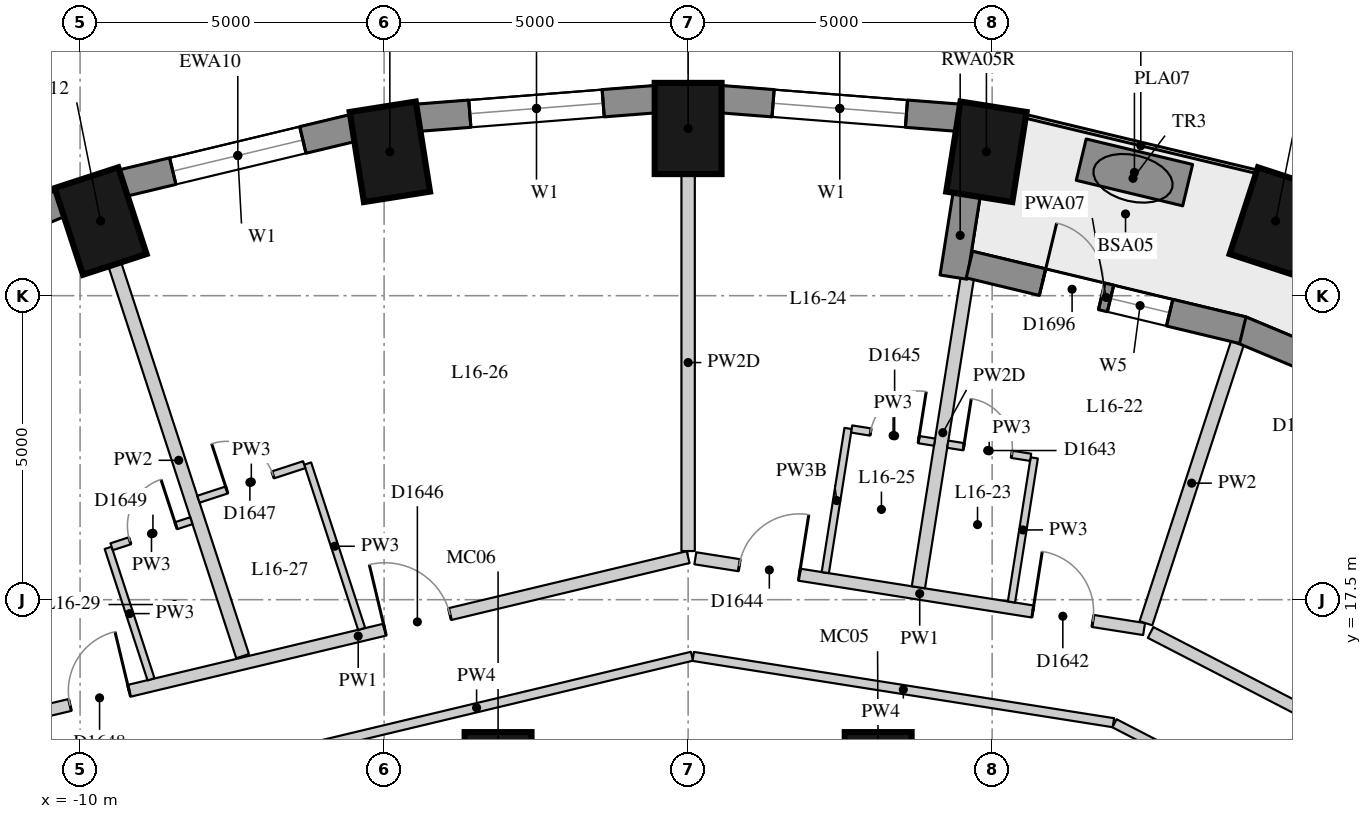
"""IFC4 building model, lengths in metres.
Left out: names, types, materials, properties, quantities, classifications, styles, units other than length and angle.
Written with IfcOpenShell. Run it as: python <this file> out.ifc"""

import sys

from ifc_helpers import new_model, si_unit, direction, frame, frame_2d, origin, origin_2d, place, context, subcontext, project, spatial, rectangle, extrude, element, fill, save


model = new_model("IFC4")
c1 = context("Model", 3, precision=1e-05, world=origin(), true_north=direction((0.0, 1.0)))
c2 = subcontext(c1, "Body", "Model", "MODEL_VIEW")
j1 = project(units=[si_unit("LENGTHUNIT", "METRE"), si_unit("PLANEANGLEUNIT", "RADIAN")], contexts=[c1])
p1 = place(None, origin())
s1 = spatial("IfcSite", under=j1, at=p1, CompositionType="ELEMENT")
p2 = place(p1, origin())
s2 = spatial("IfcBuilding", under=s1, at=p2, CompositionType="ELEMENT")
p3 = place(p2, frame((0.0, 0.0, 61.3)))
s3 = spatial("IfcBuildingStorey", under=s2, at=p3, CompositionType="ELEMENT", Elevation=61.3)
for number, where, z_axis, x_axis in (
    (1, (9.662, 23.727, 0.0), (0.0, 0.0, 1.0), (0.31, 0.951, 0.0)),
    (2, (4.906, 24.866, 0.0), (0.0, 0.0, 1.0), (0.156, 0.988, 0.0)),
    (3, (0.0, 25.25, 0.0), (0.0, 0.0, 1.0), (0.0, 1.0, 0.0)),
    (4, (-4.906, 24.866, 0.0), (0.0, 0.0, 1.0), (-0.156, 0.988, 0.0)),
    (5, (-9.662, 23.727, 0.0), (0.0, 0.0, 1.0), (-0.31, 0.951, 0.0)),
):
    element("IfcColumn", number, at=place(p3, frame(where, z_axis=z_axis, x_axis=x_axis)), inside=s3, PredefinedType="COLUMN", context=c2, shape_type="SweptSolid", body=[
        extrude(rectangle(XDim=1.5, YDim=1.1, at=origin_2d()), origin(), (0.0, 0.0, 1.0), 3.3),
    ])
for number, where, z_axis, x_axis in (
    (6, (3.126, 14.772, 0.0), (0.0, 0.0, 1.0), (1.0, 0.0, 0.0)),
    (7, (-3.126, 14.772, 0.0), (0.0, 0.0, 1.0), (1.0, 0.0, 0.0)),
):
    element("IfcColumn", number, at=place(p3, frame(where, z_axis=z_axis, x_axis=x_axis)), inside=s3, PredefinedType="COLUMN", context=c2, shape_type="SweptSolid", body=[
        extrude(rectangle(XDim=1.1, YDim=1.1, at=origin_2d()), origin(), (0.0, 0.0, 1.0), 3.3),
    ])
p4 = place(p3, frame((4.457, 25.426, 0.0), z_axis=(0.0, 0.0, 1.0), x_axis=(-0.996955972145, 0.077966592873, 0.0)))
e8 = element("IfcWall", 8, at=p4, inside=s3, PredefinedType="SOLIDWALL", context=c2, shape_type="SweptSolid", body=[
    extrude(rectangle(XDim=3.939, YDim=0.45, at=frame_2d((1.97, 0.0))), origin(), (0.0, 0.0, 1.0), 3.02),
])
p5 = place(p4, frame((0.87, 0.0, 0.4)))
e9 = element("IfcOpeningElement", 9, at=p5, cuts=e8, PredefinedType="OPENING", context=c2, shape_type="SweptSolid", body=[
    extrude(rectangle(XDim=2.2, YDim=1.75, at=frame_2d((1.1, 0.875))), frame((0.0, 0.235, 0.0), z_axis=(0.0, -1.0, 0.0), x_axis=(1.0, 0.0, 0.0)), (0.0, 0.0, 1.0), 0.47),
])
p6 = place(p3, frame((-0.53, 25.733, 0.0), z_axis=(0.0, 0.0, 1.0), x_axis=(-0.996955972145, -0.077966592873, 0.0)))
e10 = element("IfcWall", 10, at=p6, inside=s3, PredefinedType="SOLIDWALL", context=c2, shape_type="SweptSolid", body=[
    extrude(rectangle(XDim=3.939, YDim=0.45, at=frame_2d((1.97, 0.0))), origin(), (0.0, 0.0, 1.0), 3.02),
])
p7 = place(p6, frame((0.87, 0.0, 0.4)))
e11 = element("IfcOpeningElement", 11, at=p7, cuts=e10, PredefinedType="OPENING", context=c2, shape_type="SweptSolid", body=[
    extrude(rectangle(XDim=2.2, YDim=1.75, at=frame_2d((1.1, 0.875))), frame((0.0, 0.235, 0.0), z_axis=(0.0, -1.0, 0.0), x_axis=(1.0, 0.0, 0.0)), (0.0, 0.0, 1.0), 0.47),
])
p8 = place(p3, frame((-5.504, 25.26, 0.0), z_axis=(0.0, 0.0, 1.0), x_axis=(-0.972496561493, -0.232917233979, 0.0)))
e12 = element("IfcWall", 12, at=p8, inside=s3, PredefinedType="SOLIDWALL", context=c2, shape_type="SweptSolid", body=[
    extrude(rectangle(XDim=3.911, YDim=0.45, at=frame_2d((1.956, 0.0))), origin(), (0.0, 0.0, 1.0), 3.02),
])
p9 = place(p8, frame((0.855, 0.0, 0.4)))
e13 = element("IfcOpeningElement", 13, at=p9, cuts=e12, PredefinedType="OPENING", context=c2, shape_type="SweptSolid", body=[
    extrude(rectangle(XDim=2.2, YDim=1.75, at=frame_2d((1.1, 0.875))), frame((0.0, 0.235, 0.0), z_axis=(0.0, -1.0, 0.0), x_axis=(1.0, 0.0, 0.0)), (0.0, 0.0, 1.0), 0.47),
])
p10 = place(p3, frame((-10.315, 24.021, 0.0), z_axis=(0.0, 0.0, 1.0), x_axis=(-0.923031964282, -0.384723267966, 0.0)))
e14 = element("IfcWall", 14, at=p10, inside=s3, PredefinedType="SOLIDWALL", context=c2, shape_type="SweptSolid", body=[
    extrude(rectangle(XDim=3.856, YDim=0.45, at=frame_2d((1.928, 0.0))), origin(), (0.0, 0.0, 1.0), 3.02),
])
p11 = place(p10, frame((0.828, 0.0, 0.4)))
e15 = element("IfcOpeningElement", 15, at=p11, cuts=e14, PredefinedType="OPENING", context=c2, shape_type="SweptSolid", body=[
    extrude(rectangle(XDim=2.2, YDim=1.75, at=frame_2d((1.1, 0.875))), frame((0.0, 0.235, 0.0), z_axis=(0.0, -1.0, 0.0), x_axis=(1.0, 0.0, 0.0)), (0.0, 0.0, 1.0), 0.47),
])
p12 = place(p3, frame((4.583, 24.178, 0.0), z_axis=(0.0, 0.0, 1.0), x_axis=(-0.156133927791, -0.98773589415, 0.0)))
e16 = element("IfcWall", 16, at=p12, inside=s3, PredefinedType="SOLIDWALL", context=c2, shape_type="SweptSolid", body=[
    extrude(rectangle(XDim=1.39, YDim=0.45, at=frame_2d((0.695, 0.0))), origin(), (0.0, 0.0, 1.0), 2.47),
])
p13 = place(p3, frame((13.31, 20.178, 0.0), z_axis=(0.0, 0.0, 1.0), x_axis=(-0.922634412489, 0.385675693935, 0.0)))
e17 = element("IfcWall", 17, at=p13, inside=s3, PredefinedType="SOLIDWALL", context=c2, shape_type="SweptSolid", body=[
    extrude(rectangle(XDim=4.577, YDim=0.45, at=frame_2d((2.288, 0.0))), origin(), (0.0, 0.0, 1.0), 3.02),
])
p14 = place(p13, frame((1.213, 0.0, 0.4)))
e18 = element("IfcOpeningElement", 18, at=p14, cuts=e17, PredefinedType="OPENING", context=c2, shape_type="SweptSolid", body=[
    extrude(rectangle(XDim=1.0, YDim=1.75, at=frame_2d((0.5, 0.875))), frame((0.0, 0.235, 0.0), z_axis=(0.0, -1.0, 0.0), x_axis=(1.0, 0.0, 0.0)), (0.0, 0.0, 1.0), 0.47),
])
p15 = place(p13, frame((2.363, 0.0, 0.0)))
e19 = element("IfcOpeningElement", 19, at=p15, cuts=e17, PredefinedType="OPENING", context=c2, shape_type="SweptSolid", body=[
    extrude(rectangle(XDim=1.0, YDim=2.15, at=frame_2d((0.5, 1.075))), frame((0.0, 0.235, 0.0), z_axis=(0.0, -1.0, 0.0), x_axis=(1.0, 0.0, 0.0)), (0.0, 0.0, 1.0), 0.47),
])
p16 = place(p3, frame((9.122, 21.932, 0.0), z_axis=(0.0, 0.0, 1.0), x_axis=(-0.972346547441, 0.233542697764, 0.0)))
e20 = element("IfcWall", 20, at=p16, inside=s3, PredefinedType="SOLIDWALL", context=c2, shape_type="SweptSolid", body=[
    extrude(rectangle(XDim=4.624, YDim=0.45, at=frame_2d((2.312, 0.0))), origin(), (0.0, 0.0, 1.0), 3.02),
])
p17 = place(p16, frame((1.237, 0.0, 0.4)))
e21 = element("IfcOpeningElement", 21, at=p17, cuts=e20, PredefinedType="OPENING", context=c2, shape_type="SweptSolid", body=[
    extrude(rectangle(XDim=1.0, YDim=1.75, at=frame_2d((0.5, 0.875))), frame((0.0, 0.235, 0.0), z_axis=(0.0, -1.0, 0.0), x_axis=(1.0, 0.0, 0.0)), (0.0, 0.0, 1.0), 0.47),
])
p18 = place(p16, frame((2.387, 0.0, 0.0)))
e22 = element("IfcOpeningElement", 22, at=p18, cuts=e20, PredefinedType="OPENING", context=c2, shape_type="SweptSolid", body=[
    extrude(rectangle(XDim=1.0, YDim=2.15, at=frame_2d((0.5, 1.075))), frame((0.0, 0.235, 0.0), z_axis=(0.0, -1.0, 0.0), x_axis=(1.0, 0.0, 0.0)), (0.0, 0.0, 1.0), 0.47),
])
p19 = place(p3, frame((8.215, 24.318, 0.0), z_axis=(0.0, 0.0, 1.0), x_axis=(-0.972504142103, 0.232885580473, 0.0)))
e23 = element("IfcWall", 23, at=p19, inside=s3, PredefinedType="USERDEFINED", context=c2, shape_type="SweptSolid", body=[
    extrude(rectangle(XDim=1.8, YDim=0.7, at=frame_2d((0.9, 0.0))), origin(), (0.0, 0.0, 1.0), 0.75),
])
p20 = place(p3, frame((-10.852, 15.605, 0.0), z_axis=(0.0, 0.0, 1.0), x_axis=(0.972573296372, 0.232596610431, 0.0)))
e24 = element("IfcWall", 24, at=p20, inside=s3, PredefinedType="PARTITIONING", context=c2, shape_type="SweptSolid", body=[
    extrude(rectangle(XDim=11.157, YDim=0.2, at=frame_2d((5.579, 0.0))), origin(), (0.0, 0.0, 1.0), 3.02),
])
p21 = place(p20, frame((6.029, 0.0, 0.0)))
e25 = element("IfcOpeningElement", 25, at=p21, cuts=e24, PredefinedType="OPENING", context=c2, shape_type="SweptSolid", body=[
    extrude(rectangle(XDim=1.1, YDim=2.1, at=frame_2d((0.55, 1.05))), frame((0.0, 0.11, 0.0), z_axis=(0.0, -1.0, 0.0), x_axis=(1.0, 0.0, 0.0)), (0.0, 0.0, 1.0), 0.22),
])
p22 = place(p20, frame((0.705, 0.0, 0.0)))
e26 = element("IfcOpeningElement", 26, at=p22, cuts=e24, PredefinedType="OPENING", context=c2, shape_type="SweptSolid", body=[
    extrude(rectangle(XDim=1.0, YDim=2.1, at=frame_2d((0.5, 1.05))), frame((0.0, 0.11, 0.0), z_axis=(0.0, -1.0, 0.0), x_axis=(1.0, 0.0, 0.0)), (0.0, 0.0, 1.0), 0.22),
])
p23 = place(p3, frame((0.119, 18.181, 0.0), z_axis=(0.0, 0.0, 1.0), x_axis=(0.987788122462, -0.155803161464, 0.0)))
e27 = element("IfcWall", 27, at=p23, inside=s3, PredefinedType="PARTITIONING", context=c2, shape_type="SweptSolid", body=[
    extrude(rectangle(XDim=7.471, YDim=0.2, at=frame_2d((3.736, 0.0))), origin(), (0.0, 0.0, 1.0), 3.02),
])
p24 = place(p23, frame((5.619, 0.0, 0.0)))
e28 = element("IfcOpeningElement", 28, at=p24, cuts=e27, PredefinedType="OPENING", context=c2, shape_type="SweptSolid", body=[
    extrude(rectangle(XDim=1.0, YDim=2.1, at=frame_2d((0.5, 1.05))), frame((0.0, 0.11, 0.0), z_axis=(0.0, -1.0, 0.0), x_axis=(1.0, 0.0, 0.0)), (0.0, 0.0, 1.0), 0.22),
])
p25 = place(p23, frame((0.732, 0.0, 0.0)))
e29 = element("IfcOpeningElement", 29, at=p25, cuts=e27, PredefinedType="OPENING", context=c2, shape_type="SweptSolid", body=[
    extrude(rectangle(XDim=1.0, YDim=2.1, at=frame_2d((0.5, 1.05))), frame((0.0, 0.11, 0.0), z_axis=(0.0, -1.0, 0.0), x_axis=(1.0, 0.0, 0.0)), (0.0, 0.0, 1.0), 0.22),
])
p26 = place(p3, frame((7.606, 16.961, 0.0), z_axis=(0.0, 0.0, 1.0), x_axis=(0.888519518851, -0.45883882205, 0.0)))
e30 = element("IfcWall", 30, at=p26, inside=s3, PredefinedType="PARTITIONING", context=c2, shape_type="SweptSolid", body=[
    extrude(rectangle(XDim=7.142, YDim=0.2, at=frame_2d((3.571, 0.0))), origin(), (0.0, 0.0, 1.0), 3.02),
])
p27 = place(p26, frame((3.342, 0.0, 0.0)))
e31 = element("IfcOpeningElement", 31, at=p27, cuts=e30, PredefinedType="OPENING", context=c2, shape_type="SweptSolid", body=[
    extrude(rectangle(XDim=1.1, YDim=2.1, at=frame_2d((0.55, 1.05))), frame((0.0, 0.11, 0.0), z_axis=(0.0, -1.0, 0.0), x_axis=(1.0, 0.0, 0.0)), (0.0, 0.0, 1.0), 0.22),
])
p28 = place(p3, frame((-7.022, 14.875, 0.0), z_axis=(0.0, 0.0, 1.0), x_axis=(0.972565872543, 0.232627650043, 0.0)))
e32 = element("IfcWall", 32, at=p28, inside=s3, PredefinedType="PARTITIONING", context=c2, shape_type="SweptSolid", body=[
    extrude(rectangle(XDim=7.286, YDim=0.15, at=frame_2d((3.643, 0.0))), origin(), (0.0, 0.0, 1.0), 3.02),
])
p29 = place(p3, frame((0.083, 16.567, 0.0), z_axis=(0.0, 0.0, 1.0), x_axis=(0.987781067139, -0.15584788546, 0.0)))
e33 = element("IfcWall", 33, at=p29, inside=s3, PredefinedType="PARTITIONING", context=c2, shape_type="SweptSolid", body=[
    extrude(rectangle(XDim=6.996, YDim=0.15, at=frame_2d((3.498, 0.0))), origin(), (0.0, 0.0, 1.0), 3.02),
])
p30 = place(p3, frame((7.012, 15.467, 0.0), z_axis=(0.0, 0.0, 1.0), x_axis=(0.888509096081, -0.458859004685, 0.0)))
e34 = element("IfcWall", 34, at=p30, inside=s3, PredefinedType="PARTITIONING", context=c2, shape_type="SweptSolid", body=[
    extrude(rectangle(XDim=6.561, YDim=0.15, at=frame_2d((3.281, 0.0))), origin(), (0.0, 0.0, 1.0), 3.02),
])
p31 = place(p3, frame((9.034, 21.721, 0.0), z_axis=(0.0, 0.0, 1.0), x_axis=(-0.310330277344, -0.95062880188, 0.0)))
e35 = element("IfcWall", 35, at=p31, inside=s3, PredefinedType="PARTITIONING", context=c2, shape_type="SweptSolid", body=[
    extrude(rectangle(XDim=4.848, YDim=0.22, at=frame_2d((2.424, 0.0))), origin(), (0.0, 0.0, 1.0), 3.02),
])
p32 = place(p3, frame((4.591, 22.789, 0.0), z_axis=(0.0, 0.0, 1.0), x_axis=(-0.156172011014, -0.987729873486, 0.0)))
e36 = element("IfcWall", 36, at=p32, inside=s3, PredefinedType="PARTITIONING", context=c2, shape_type="SweptSolid", body=[
    extrude(rectangle(XDim=5.148, YDim=0.22, at=frame_2d((2.574, 0.0))), origin(), (0.0, 0.0, 1.0), 2.47),
])
p33 = place(p3, frame((0.0, 24.5, 0.0), z_axis=(0.0, 0.0, 1.0), x_axis=(0.0, -1.0, 0.0)))
e37 = element("IfcWall", 37, at=p33, inside=s3, PredefinedType="PARTITIONING", context=c2, shape_type="SweptSolid", body=[
    extrude(rectangle(XDim=6.2, YDim=0.22, at=frame_2d((3.1, 0.0))), origin(), (0.0, 0.0, 1.0), 2.47),
])
p34 = place(p3, frame((-9.429, 23.014, 0.0), z_axis=(0.0, 0.0, 1.0), x_axis=(0.310223739243, -0.950663574357, 0.0)))
e38 = element("IfcWall", 38, at=p34, inside=s3, PredefinedType="PARTITIONING", context=c2, shape_type="SweptSolid", body=[
    extrude(rectangle(XDim=6.778, YDim=0.22, at=frame_2d((3.389, 0.0))), origin(), (0.0, 0.0, 1.0), 3.02),
])
p35 = place(p3, frame((5.318, 17.462, 0.0), z_axis=(0.0, 0.0, 1.0), x_axis=(0.156077517275, 0.987744809453, 0.0)))
e39 = element("IfcWall", 39, at=p35, inside=s3, PredefinedType="PARTITIONING", context=c2, shape_type="SweptSolid", body=[
    extrude(rectangle(XDim=2.399, YDim=0.12, at=frame_2d((1.2, 0.0))), origin(), (0.0, 0.0, 1.0), 3.02),
])
p36 = place(p3, frame((2.256, 17.945, 0.0), z_axis=(0.0, 0.0, 1.0), x_axis=(0.156114026572, 0.987739039781, 0.0)))
e40 = element("IfcWall", 40, at=p36, inside=s3, PredefinedType="PARTITIONING", context=c2, shape_type="SweptSolid", body=[
    extrude(rectangle(XDim=2.401, YDim=0.12, at=frame_2d((1.2, 0.0))), origin(), (0.0, 0.0, 1.0), 2.47),
])
p37 = place(p3, frame((-5.369, 17.019, 0.0), z_axis=(0.0, 0.0, 1.0), x_axis=(-0.310231838646, 0.950660931295, 0.0)))
e41 = element("IfcWall", 41, at=p37, inside=s3, PredefinedType="PARTITIONING", context=c2, shape_type="SweptSolid", body=[
    extrude(rectangle(XDim=2.861, YDim=0.12, at=frame_2d((1.431, 0.0))), origin(), (0.0, 0.0, 1.0), 3.02),
])
p38 = place(p3, frame((-8.833, 16.19, 0.0), z_axis=(0.0, 0.0, 1.0), x_axis=(-0.310231525188, 0.950661033586, 0.0)))
e42 = element("IfcWall", 42, at=p38, inside=s3, PredefinedType="PARTITIONING", context=c2, shape_type="SweptSolid", body=[
    extrude(rectangle(XDim=2.274, YDim=0.12, at=frame_2d((1.137, 0.0))), origin(), (0.0, 0.0, 1.0), 3.02),
])
p39 = place(p3, frame((5.633, 19.842, 0.0), z_axis=(0.0, 0.0, 1.0), x_axis=(-0.987722767831, 0.156216945011, 0.0)))
e43 = element("IfcWall", 43, at=p39, inside=s3, PredefinedType="PARTITIONING", context=c2, shape_type="SweptSolid", body=[
    extrude(rectangle(XDim=1.38, YDim=0.12, at=frame_2d((0.69, 0.0))), origin(), (0.0, 0.0, 1.0), 3.02),
])
p40 = place(p39, frame((0.315, 0.0, 0.0)))
e44 = element("IfcOpeningElement", 44, at=p40, cuts=e43, PredefinedType="OPENING", context=c2, shape_type="SweptSolid", body=[
    extrude(rectangle(XDim=0.8, YDim=2.1, at=frame_2d((0.4, 1.05))), frame((0.0, 0.07, 0.0), z_axis=(0.0, -1.0, 0.0), x_axis=(1.0, 0.0, 0.0)), (0.0, 0.0, 1.0), 0.14),
])
p41 = place(p3, frame((2.69, 20.307, 0.0), z_axis=(0.0, 0.0, 1.0), x_axis=(0.987695455518, -0.156389536571, 0.0)))
e45 = element("IfcWall", 45, at=p41, inside=s3, PredefinedType="PARTITIONING", context=c2, shape_type="SweptSolid", body=[
    extrude(rectangle(XDim=1.38, YDim=0.12, at=frame_2d((0.69, 0.0))), origin(), (0.0, 0.0, 1.0), 3.02),
])
p42 = place(p41, frame((0.315, 0.0, 0.0)))
e46 = element("IfcOpeningElement", 46, at=p42, cuts=e45, PredefinedType="OPENING", context=c2, shape_type="SweptSolid", body=[
    extrude(rectangle(XDim=0.8, YDim=2.1, at=frame_2d((0.4, 1.05))), frame((0.0, 0.07, 0.0), z_axis=(0.0, -1.0, 0.0), x_axis=(1.0, 0.0, 0.0)), (0.0, 0.0, 1.0), 0.14),
])
p43 = place(p3, frame((-6.314, 19.72, 0.0), z_axis=(0.0, 0.0, 1.0), x_axis=(-0.950639191072, -0.310298450524, 0.0)))
e47 = element("IfcWall", 47, at=p43, inside=s3, PredefinedType="PARTITIONING", context=c2, shape_type="SweptSolid", body=[
    extrude(rectangle(XDim=1.83, YDim=0.12, at=frame_2d((0.915, 0.0))), origin(), (0.0, 0.0, 1.0), 3.02),
])
p44 = place(p43, frame((0.54, 0.0, 0.0)))
e48 = element("IfcOpeningElement", 48, at=p44, cuts=e47, PredefinedType="OPENING", context=c2, shape_type="SweptSolid", body=[
    extrude(rectangle(XDim=0.8, YDim=2.1, at=frame_2d((0.4, 1.05))), frame((0.0, 0.07, 0.0), z_axis=(0.0, -1.0, 0.0), x_axis=(1.0, 0.0, 0.0)), (0.0, 0.0, 1.0), 0.14),
])
p45 = place(p3, frame((-9.481, 18.371, 0.0), z_axis=(0.0, 0.0, 1.0), x_axis=(0.950576687533, 0.310489872812, 0.0)))
e49 = element("IfcWall", 49, at=p45, inside=s3, PredefinedType="PARTITIONING", context=c2, shape_type="SweptSolid", body=[
    extrude(rectangle(XDim=1.38, YDim=0.12, at=frame_2d((0.69, 0.0))), origin(), (0.0, 0.0, 1.0), 3.02),
])
p46 = place(p45, frame((0.315, 0.0, 0.0)))
e50 = element("IfcOpeningElement", 50, at=p46, cuts=e49, PredefinedType="OPENING", context=c2, shape_type="SweptSolid", body=[
    extrude(rectangle(XDim=0.8, YDim=2.1, at=frame_2d((0.4, 1.05))), frame((0.0, 0.07, 0.0), z_axis=(0.0, -1.0, 0.0), x_axis=(1.0, 0.0, 0.0)), (0.0, 0.0, 1.0), 0.14),
])
p47 = place(p5, origin())
e51 = element("IfcWindow", 51, at=p47, inside=s3, PartitioningType="SINGLE_PANEL", PredefinedType="WINDOW", context=c2, shape_type="SweptSolid", body=[
    extrude(rectangle(XDim=2.2, YDim=1.75, at=frame_2d((1.1, 0.875))), frame((0.0, 0.035, 0.0), z_axis=(0.0, -1.0, 0.0), x_axis=(1.0, 0.0, 0.0)), (0.0, 0.0, 1.0), 0.06),
])
fill(e9, e51)
p48 = place(p7, origin())
e52 = element("IfcWindow", 52, at=p48, inside=s3, PartitioningType="SINGLE_PANEL", PredefinedType="WINDOW", context=c2, shape_type="SweptSolid", body=[
    extrude(rectangle(XDim=2.2, YDim=1.75, at=frame_2d((1.1, 0.875))), frame((0.0, 0.035, 0.0), z_axis=(0.0, -1.0, 0.0), x_axis=(1.0, 0.0, 0.0)), (0.0, 0.0, 1.0), 0.06),
])
fill(e11, e52)
p49 = place(p9, origin())
e53 = element("IfcWindow", 53, at=p49, inside=s3, PartitioningType="SINGLE_PANEL", PredefinedType="WINDOW", context=c2, shape_type="SweptSolid", body=[
    extrude(rectangle(XDim=2.2, YDim=1.75, at=frame_2d((1.1, 0.875))), frame((0.0, 0.035, 0.0), z_axis=(0.0, -1.0, 0.0), x_axis=(1.0, 0.0, 0.0)), (0.0, 0.0, 1.0), 0.06),
])
fill(e13, e53)
p50 = place(p17, origin())
e54 = element("IfcWindow", 54, at=p50, inside=s3, PartitioningType="SINGLE_PANEL", PredefinedType="WINDOW", context=c2, shape_type="SweptSolid", body=[
    extrude(rectangle(XDim=1.0, YDim=1.75, at=frame_2d((0.5, 0.875))), frame((0.0, 0.035, 0.0), z_axis=(0.0, -1.0, 0.0), x_axis=(1.0, 0.0, 0.0)), (0.0, 0.0, 1.0), 0.06),
])
fill(e21, e54)
p51 = place(p18, frame((1.0, 0.0, 0.0), z_axis=(0.0, 0.0, 1.0), x_axis=(-1.0, 0.0, 0.0)))
e55 = element("IfcDoor", 55, at=p51, inside=s3, OperationType="SINGLE_SWING_LEFT", PredefinedType="DOOR", context=c2, shape_type="SweptSolid", body=[
    extrude(rectangle(XDim=1.0, YDim=2.15, at=frame_2d((0.5, 1.075))), frame((0.0, 0.075, 0.0), z_axis=(0.0, -1.0, 0.0), x_axis=(1.0, 0.0, 0.0)), (0.0, 0.0, 1.0), 0.05),
])
fill(e22, e55)
p52 = place(p24, origin())
e56 = element("IfcDoor", 56, at=p52, inside=s3, OperationType="SINGLE_SWING_LEFT", PredefinedType="DOOR", context=c2, shape_type="SweptSolid", body=[
    extrude(rectangle(XDim=1.0, YDim=2.1, at=frame_2d((0.5, 1.05))), frame((0.0, 0.025, 0.0), z_axis=(0.0, -1.0, 0.0), x_axis=(1.0, 0.0, 0.0)), (0.0, 0.0, 1.0), 0.05),
])
fill(e28, e56)
p53 = place(p40, origin())
e57 = element("IfcDoor", 57, at=p53, inside=s3, OperationType="SINGLE_SWING_LEFT", PredefinedType="DOOR", context=c2, shape_type="SweptSolid", body=[
    extrude(rectangle(XDim=0.8, YDim=2.1, at=frame_2d((0.4, 1.05))), frame((0.0, 0.025, 0.0), z_axis=(0.0, -1.0, 0.0), x_axis=(1.0, 0.0, 0.0)), (0.0, 0.0, 1.0), 0.05),
])
fill(e44, e57)
p54 = place(p25, origin())
e58 = element("IfcDoor", 58, at=p54, inside=s3, OperationType="SINGLE_SWING_RIGHT", PredefinedType="DOOR", context=c2, shape_type="SweptSolid", body=[
    extrude(rectangle(XDim=1.0, YDim=2.1, at=frame_2d((0.5, 1.05))), frame((0.0, 0.025, 0.0), z_axis=(0.0, -1.0, 0.0), x_axis=(1.0, 0.0, 0.0)), (0.0, 0.0, 1.0), 0.05),
])
fill(e29, e58)
p55 = place(p42, origin())
e59 = element("IfcDoor", 59, at=p55, inside=s3, OperationType="SINGLE_SWING_RIGHT", PredefinedType="DOOR", context=c2, shape_type="SweptSolid", body=[
    extrude(rectangle(XDim=0.8, YDim=2.1, at=frame_2d((0.4, 1.05))), frame((0.0, 0.025, 0.0), z_axis=(0.0, -1.0, 0.0), x_axis=(1.0, 0.0, 0.0)), (0.0, 0.0, 1.0), 0.05),
])
fill(e46, e59)
p56 = place(p21, origin())
e60 = element("IfcDoor", 60, at=p56, inside=s3, OperationType="SINGLE_SWING_LEFT", PredefinedType="DOOR", context=c2, shape_type="SweptSolid", body=[
    extrude(rectangle(XDim=1.1, YDim=2.1, at=frame_2d((0.55, 1.05))), frame((0.0, 0.025, 0.0), z_axis=(0.0, -1.0, 0.0), x_axis=(1.0, 0.0, 0.0)), (0.0, 0.0, 1.0), 0.05),
])
fill(e25, e60)
p57 = place(p44, origin())
e61 = element("IfcDoor", 61, at=p57, inside=s3, OperationType="SINGLE_SWING_LEFT", PredefinedType="DOOR", context=c2, shape_type="SweptSolid", body=[
    extrude(rectangle(XDim=0.8, YDim=2.1, at=frame_2d((0.4, 1.05))), frame((0.0, 0.025, 0.0), z_axis=(0.0, -1.0, 0.0), x_axis=(1.0, 0.0, 0.0)), (0.0, 0.0, 1.0), 0.05),
])
fill(e48, e61)
p58 = place(p22, origin())
e62 = element("IfcDoor", 62, at=p58, inside=s3, OperationType="SINGLE_SWING_RIGHT", PredefinedType="DOOR", context=c2, shape_type="SweptSolid", body=[
    extrude(rectangle(XDim=1.0, YDim=2.1, at=frame_2d((0.5, 1.05))), frame((0.0, 0.025, 0.0), z_axis=(0.0, -1.0, 0.0), x_axis=(1.0, 0.0, 0.0)), (0.0, 0.0, 1.0), 0.05),
])
fill(e26, e62)
p59 = place(p46, origin())
e63 = element("IfcDoor", 63, at=p59, inside=s3, OperationType="SINGLE_SWING_RIGHT", PredefinedType="DOOR", context=c2, shape_type="SweptSolid", body=[
    extrude(rectangle(XDim=0.8, YDim=2.1, at=frame_2d((0.4, 1.05))), frame((0.0, 0.025, 0.0), z_axis=(0.0, -1.0, 0.0), x_axis=(1.0, 0.0, 0.0)), (0.0, 0.0, 1.0), 0.05),
])
fill(e50, e63)
save(model, sys.argv[1])
